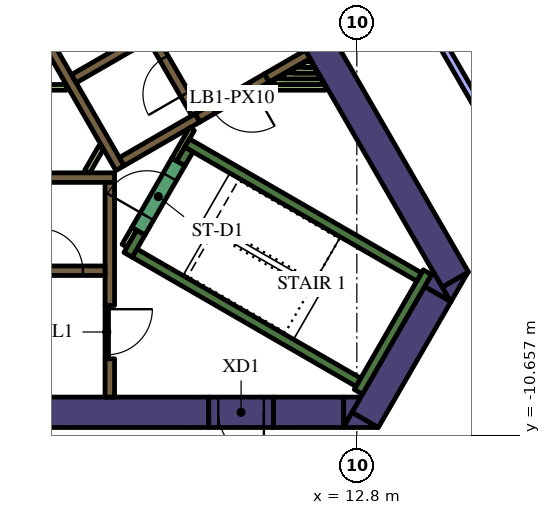
"""IFC4 building model, lengths in metres.
Left out: names, types, materials, properties, quantities, classifications, styles, units other than length and angle.
Written with IfcOpenShell. Run it as: python <this file> out.ifc"""

import sys

from ifc_helpers import new_model, si_unit, direction, frame, frame_2d, origin, place, context, subcontext, project, spatial, polyline, rectangle, outline, extrude, element, fill, save


model = new_model("IFC4")
c1 = context("Model", 3, precision=1e-05, world=origin(), true_north=direction((0.0, 1.0)))
c2 = subcontext(c1, "Body", "Model", "MODEL_VIEW")
j1 = project(units=[si_unit("LENGTHUNIT", "METRE"), si_unit("PLANEANGLEUNIT", "RADIAN")], contexts=[c1])
p1 = place(None, origin())
s1 = spatial("IfcSite", under=j1, at=p1, CompositionType="ELEMENT")
p2 = place(p1, origin())
s2 = spatial("IfcBuilding", under=s1, at=p2, CompositionType="ELEMENT")
p3 = place(p2, frame((0.0, 0.0, 166.8)))
s3 = spatial("IfcBuildingStorey", under=s2, at=p3, CompositionType="ELEMENT", Elevation=166.8)
p4 = place(p3, frame((9.129, 4.289, 0.0), z_axis=(0.0, 0.0, 1.0), x_axis=(0.499995742806, -0.866027861663, 0.0)))
e1 = element("IfcWall", 1, at=p4, inside=s3, PredefinedType="SOLIDWALL", context=c2, shape_type="SweptSolid", body=[
    extrude(rectangle(XDim=12.527, YDim=0.8, at=frame_2d((6.264, 0.0))), origin(), (0.0, 0.0, 1.0), 4.2),
])
p5 = place(p3, origin())
e2 = element("IfcWall", 2, at=p5, inside=s3, PredefinedType="SOLIDWALL", context=c2, shape_type="SweptSolid", body=[
    extrude(outline(polyline([(15.271, -7.15), (15.047, -6.762), (15.719, -6.374), (15.271, -7.15)])), origin(), (0.0, 0.0, 1.0), 4.2),
])
p6 = place(p3, frame((13.018, -10.252, 0.0), z_axis=(0.0, 0.0, 1.0), x_axis=(0.499984020225, 0.866034629516, 0.0)))
e3 = element("IfcWall", 3, at=p6, inside=s3, PredefinedType="SOLIDWALL", context=c2, shape_type="SweptSolid", body=[
    extrude(rectangle(XDim=3.824, YDim=0.8, at=frame_2d((1.912, 0.0))), origin(), (0.0, 0.0, 1.0), 4.2),
])
e4 = element("IfcWall", 4, at=p5, inside=s3, PredefinedType="SOLIDWALL", context=c2, shape_type="SweptSolid", body=[
    extrude(outline(polyline([(12.442, -10.45), (12.671, -10.053), (13.358, -10.45), (12.442, -10.45)])), origin(), (0.0, 0.0, 1.0), 4.2),
])
e5 = element("IfcWall", 5, at=p5, inside=s3, PredefinedType="SOLIDWALL", context=c2, shape_type="SweptSolid", body=[
    extrude(outline(polyline([(14.809, -6.35), (15.257, -7.126), (14.585, -6.738), (14.809, -6.35)])), origin(), (0.0, 0.0, 1.0), 4.2),
])
p7 = place(p3, frame((10.604, -10.05, 0.0), z_axis=(0.0, 0.0, 1.0), x_axis=(1.0, 0.0, 0.0)))
e6 = element("IfcWall", 6, at=p7, inside=s3, PredefinedType="SOLIDWALL", context=c2, shape_type="SweptSolid", body=[
    extrude(rectangle(XDim=1.849, YDim=0.8, at=frame_2d((0.925, 0.0))), origin(), (0.0, 0.0, 1.0), 4.2),
])
e7 = element("IfcWall", 7, at=p5, inside=s3, PredefinedType="SOLIDWALL", context=c2, shape_type="SweptSolid", body=[
    extrude(outline(polyline([(12.904, -9.65), (12.456, -10.426), (12.456, -9.65), (12.904, -9.65)])), origin(), (0.0, 0.0, 1.0), 4.2),
])
p8 = place(p3, frame((-13.378, -10.05, 0.0), z_axis=(0.0, 0.0, 1.0), x_axis=(1.0, 0.0, 0.0)))
e8 = element("IfcWall", 8, at=p8, inside=s3, PredefinedType="SOLIDWALL", context=c2, shape_type="SweptSolid", body=[
    extrude(rectangle(XDim=22.282, YDim=0.8, at=frame_2d((11.141, 0.0))), origin(), (0.0, 0.0, 1.0), 4.2),
])
p9 = place(p3, frame((12.84, -9.511, 0.0), z_axis=(0.0, 0.0, 1.0), x_axis=(0.499997733992, 0.866026712061, 0.0)))
e9 = element("IfcWall", 9, at=p9, inside=s3, PredefinedType="SOLIDWALL", context=c2, shape_type="SweptSolid", body=[
    extrude(rectangle(XDim=3.634, YDim=0.25, at=frame_2d((1.817, 0.0))), origin(), (0.0, 0.0, 1.0), 4.2),
])
p10 = place(p3, frame((12.84, -9.261, 0.0), z_axis=(0.0, 0.0, 1.0), x_axis=(-0.866013990052, 0.500019768644, 0.0)))
e10 = element("IfcWall", 10, at=p10, inside=s3, PredefinedType="SOLIDWALL", context=c2, shape_type="SweptSolid", body=[
    extrude(rectangle(XDim=6.8, YDim=0.25, at=frame_2d((3.4, 0.0))), origin(), (0.0, 0.0, 1.0), 4.2),
])
p11 = place(p3, frame((6.78, -5.906, 0.0), z_axis=(0.0, 0.0, 1.0), x_axis=(0.500223362819, 0.865896406789, 0.0)))
e11 = element("IfcWall", 11, at=p11, inside=s3, PredefinedType="SOLIDWALL", context=c2, shape_type="SweptSolid", body=[
    extrude(rectangle(XDim=0.675, YDim=0.25, at=frame_2d((0.337, 0.0))), origin(), (0.0, 0.0, 1.0), 4.2),
])
p12 = place(p3, frame((8.334, -2.964, 0.0), z_axis=(0.0, 0.0, 1.0), x_axis=(0.866016039709, -0.500016218704, 0.0)))
e12 = element("IfcWall", 12, at=p12, inside=s3, PredefinedType="SOLIDWALL", context=c2, shape_type="SweptSolid", body=[
    extrude(rectangle(XDim=7.05, YDim=0.25, at=frame_2d((3.525, 0.0))), origin(), (0.0, 0.0, 1.0), 4.2),
])
p13 = place(p3, frame((8.168, -3.503, 0.0), z_axis=(0.0, 0.0, 1.0), x_axis=(0.49972245349, 0.866185586049, 0.0)))
e13 = element("IfcWall", 13, at=p13, inside=s3, PredefinedType="SOLIDWALL", context=c2, shape_type="SweptSolid", body=[
    extrude(rectangle(XDim=0.425, YDim=0.25, at=frame_2d((0.212, 0.0))), origin(), (0.0, 0.0, 1.0), 4.2),
])
p14 = place(p3, frame((-5.545, -3.875, 0.0), z_axis=(0.0, 0.0, 1.0), x_axis=(1.0, 0.0, 0.0)))
e14 = element("IfcWall", 14, at=p14, inside=s3, PredefinedType="SOLIDWALL", context=c2, shape_type="SweptSolid", body=[
    extrude(rectangle(XDim=11.97, YDim=0.25, at=frame_2d((5.985, 0.0))), origin(), (0.0, 0.0, 1.0), 4.2),
])
p15 = place(p3, frame((6.3, -7.24, 0.0), z_axis=(0.0, 0.0, 1.0), x_axis=(0.0, 1.0, 0.0)))
e15 = element("IfcWall", 15, at=p15, inside=s3, PredefinedType="SOLIDWALL", context=c2, shape_type="SweptSolid", body=[
    extrude(rectangle(XDim=3.24, YDim=0.25, at=frame_2d((1.62, 0.0))), origin(), (0.0, 0.0, 1.0), 4.2),
])
p16 = place(p3, frame((6.3, -9.65, 0.0), z_axis=(0.0, 0.0, 1.0), x_axis=(0.0, 1.0, 0.0)))
e16 = element("IfcWall", 16, at=p16, inside=s3, PredefinedType="SOLIDWALL", context=c2, shape_type="SweptSolid", body=[
    extrude(rectangle(XDim=1.008, YDim=0.25, at=frame_2d((0.504, 0.0))), origin(), (0.0, 0.0, 1.0), 4.2),
])
p17 = place(p3, frame((11.507, -0.631, 0.0), z_axis=(0.0, 0.0, 1.0), x_axis=(-0.866025525965, -0.499999788377, 0.0)))
e17 = element("IfcWall", 17, at=p17, inside=s3, PredefinedType="SOLIDWALL", context=c2, shape_type="SweptSolid", body=[
    extrude(rectangle(XDim=1.245, YDim=0.25, at=frame_2d((0.622, 0.0))), origin(), (0.0, 0.0, 1.0), 4.2),
])
p18 = place(p3, frame((6.568, -3.627, 0.0), z_axis=(0.0, 0.0, 1.0), x_axis=(-0.499999455981, 0.866025717874, 0.0)))
e18 = element("IfcWall", 18, at=p18, inside=s3, PredefinedType="SOLIDWALL", context=c2, shape_type="SweptSolid", body=[
    extrude(rectangle(XDim=11.978, YDim=0.25, at=frame_2d((5.989, 0.0))), origin(), (0.0, 0.0, 1.0), 4.2),
])
p19 = place(p3, frame((5.354, -1.274, 0.0), z_axis=(0.0, 0.0, 1.0), x_axis=(0.866008176907, 0.50002983664, 0.0)))
e19 = element("IfcWall", 19, at=p19, inside=s3, PredefinedType="SOLIDWALL", context=c2, shape_type="SweptSolid", body=[
    extrude(rectangle(XDim=2.2, YDim=0.25, at=frame_2d((1.1, 0.0))), origin(), (0.0, 0.0, 1.0), 4.2),
])
p20 = place(p3, frame((6.614, -3.456, 0.0), z_axis=(0.0, 0.0, 1.0), x_axis=(0.866025089694, 0.500000544019, 0.0)))
e20 = element("IfcWall", 20, at=p20, inside=s3, PredefinedType="SOLIDWALL", context=c2, shape_type="SweptSolid", body=[
    extrude(rectangle(XDim=2.305, YDim=0.25, at=frame_2d((1.153, 0.0))), origin(), (0.0, 0.0, 1.0), 4.2),
])
p21 = place(p3, frame((10.362, -1.5, 0.0), z_axis=(0.0, 0.0, 1.0), x_axis=(1.0, 0.0, 0.0)))
e21 = element("IfcWall", 21, at=p21, inside=s3, PredefinedType="PARTITIONING", context=c2, shape_type="SweptSolid", body=[
    extrude(rectangle(XDim=1.61, YDim=0.15, at=frame_2d((0.805, 0.0))), origin(), (0.0, 0.0, 1.0), 3.15),
])
p22 = place(p3, frame((10.622, -1.35, 0.0), z_axis=(0.0, 0.0, 1.0), x_axis=(1.0, 0.0, 0.0)))
e22 = element("IfcWall", 22, at=p22, inside=s3, PredefinedType="PARTITIONING", context=c2, shape_type="SweptSolid", body=[
    extrude(rectangle(XDim=1.263, YDim=0.15, at=frame_2d((0.632, 0.0))), origin(), (0.0, 0.0, 1.0), 3.15),
])
p23 = place(p3, frame((10.882, -1.2, 0.0), z_axis=(0.0, 0.0, 1.0), x_axis=(1.0, 0.0, 0.0)))
e23 = element("IfcWall", 23, at=p23, inside=s3, PredefinedType="PARTITIONING", context=c2, shape_type="SweptSolid", body=[
    extrude(rectangle(XDim=0.917, YDim=0.15, at=frame_2d((0.459, 0.0))), origin(), (0.0, 0.0, 1.0), 3.15),
])
p24 = place(p3, frame((11.712, -1.05, 0.0), z_axis=(0.0, 0.0, 1.0), x_axis=(-1.0, 0.0, 0.0)))
e24 = element("IfcWall", 24, at=p24, inside=s3, PredefinedType="PARTITIONING", context=c2, shape_type="SweptSolid", body=[
    extrude(rectangle(XDim=0.571, YDim=0.15, at=frame_2d((0.285, 0.0))), origin(), (0.0, 0.0, 1.0), 3.15),
])
p25 = place(p3, frame((11.401, -0.9, 0.0), z_axis=(0.0, 0.0, 1.0), x_axis=(1.0, 0.0, 0.0)))
e25 = element("IfcWall", 25, at=p25, inside=s3, PredefinedType="PARTITIONING", context=c2, shape_type="SweptSolid", body=[
    extrude(rectangle(XDim=0.224, YDim=0.15, at=frame_2d((0.112, 0.0))), origin(), (0.0, 0.0, 1.0), 3.15),
])
p26 = place(p3, frame((6.945, -5.222, 0.0), z_axis=(0.0, 0.0, 1.0), x_axis=(-0.499818422106, -0.866130212453, 0.0)))
e26 = element("IfcWall", 26, at=p26, inside=s3, PredefinedType="PARTITIONING", context=c2, shape_type="SweptSolid", body=[
    extrude(rectangle(XDim=0.514, YDim=0.15, at=frame_2d((0.257, 0.0))), origin(), (0.0, 0.0, 1.0), 3.15),
])
p27 = place(p3, frame((8.459, -2.599, 0.0), z_axis=(0.0, 0.0, 1.0), x_axis=(-0.500041054325, -0.866001699761, 0.0)))
e27 = element("IfcWall", 27, at=p27, inside=s3, PredefinedType="PARTITIONING", context=c2, shape_type="SweptSolid", body=[
    extrude(rectangle(XDim=0.929, YDim=0.15, at=frame_2d((0.464, 0.0))), origin(), (0.0, 0.0, 1.0), 4.2),
])
p28 = place(p3, frame((5.705, -3.718, 0.0), z_axis=(0.0, 0.0, 1.0), x_axis=(0.499962090823, 0.866047289552, 0.0)))
e28 = element("IfcWall", 28, at=p28, inside=s3, PredefinedType="PARTITIONING", context=c2, shape_type="SweptSolid", body=[
    extrude(rectangle(XDim=0.735, YDim=0.15, at=frame_2d((0.367, 0.0))), origin(), (0.0, 0.0, 1.0), 3.15),
])
p29 = place(p3, frame((-4.2, -1.5, 0.0), z_axis=(0.0, 0.0, 1.0), x_axis=(1.0, 0.0, 0.0)))
e29 = element("IfcWall", 29, at=p29, inside=s3, PredefinedType="PARTITIONING", context=c2, shape_type="SweptSolid", body=[
    extrude(rectangle(XDim=9.359, YDim=0.15, at=frame_2d((4.68, 0.0))), origin(), (0.0, 0.0, 1.0), 3.15),
])
p30 = place(p3, frame((-6.175, -6.325, 0.0), z_axis=(0.0, 0.0, 1.0), x_axis=(1.0, 0.0, 0.0)))
e30 = element("IfcWall", 30, at=p30, inside=s3, PredefinedType="SOLIDWALL", context=c2, shape_type="SweptSolid", body=[
    extrude(rectangle(XDim=12.35, YDim=0.25, at=frame_2d((6.175, 0.0))), origin(), (0.0, 0.0, 1.0), 4.2),
])
p31 = place(p30, frame((0.585, 0.0, 0.0)))
e31 = element("IfcOpeningElement", 31, at=p31, cuts=e30, PredefinedType="OPENING", context=c2, shape_type="SweptSolid", body=[
    extrude(rectangle(XDim=1.1, YDim=2.1, at=frame_2d((0.55, 1.05))), frame((0.0, 0.135, 0.0), z_axis=(0.0, -1.0, 0.0), x_axis=(1.0, 0.0, 0.0)), (0.0, 0.0, 1.0), 0.27),
])
p32 = place(p30, frame((3.105, 0.0, 0.0)))
e32 = element("IfcOpeningElement", 32, at=p32, cuts=e30, PredefinedType="OPENING", context=c2, shape_type="SweptSolid", body=[
    extrude(rectangle(XDim=1.1, YDim=2.1, at=frame_2d((0.55, 1.05))), frame((0.0, 0.135, 0.0), z_axis=(0.0, -1.0, 0.0), x_axis=(1.0, 0.0, 0.0)), (0.0, 0.0, 1.0), 0.27),
])
p33 = place(p30, frame((5.625, 0.0, 0.0)))
e33 = element("IfcOpeningElement", 33, at=p33, cuts=e30, PredefinedType="OPENING", context=c2, shape_type="SweptSolid", body=[
    extrude(rectangle(XDim=1.1, YDim=2.1, at=frame_2d((0.55, 1.05))), frame((0.0, 0.135, 0.0), z_axis=(0.0, -1.0, 0.0), x_axis=(1.0, 0.0, 0.0)), (0.0, 0.0, 1.0), 0.27),
])
p34 = place(p30, frame((8.145, 0.0, 0.0)))
e34 = element("IfcOpeningElement", 34, at=p34, cuts=e30, PredefinedType="OPENING", context=c2, shape_type="SweptSolid", body=[
    extrude(rectangle(XDim=1.1, YDim=2.1, at=frame_2d((0.55, 1.05))), frame((0.0, 0.135, 0.0), z_axis=(0.0, -1.0, 0.0), x_axis=(1.0, 0.0, 0.0)), (0.0, 0.0, 1.0), 0.27),
])
p35 = place(p30, frame((10.665, 0.0, 0.0)))
e35 = element("IfcOpeningElement", 35, at=p35, cuts=e30, PredefinedType="OPENING", context=c2, shape_type="SweptSolid", body=[
    extrude(rectangle(XDim=1.1, YDim=2.1, at=frame_2d((0.55, 1.05))), frame((0.0, 0.135, 0.0), z_axis=(0.0, -1.0, 0.0), x_axis=(1.0, 0.0, 0.0)), (0.0, 0.0, 1.0), 0.27),
])
p36 = place(p3, frame((8.565, -2.185, 0.0), z_axis=(0.0, 0.0, 1.0), x_axis=(-0.499997954832, 0.866026584559, 0.0)))
e36 = element("IfcWall", 36, at=p36, inside=s3, PredefinedType="SOLIDWALL", context=c2, shape_type="SweptSolid", body=[
    extrude(rectangle(XDim=12.35, YDim=0.25, at=frame_2d((6.175, 0.0))), origin(), (0.0, 0.0, 1.0), 4.2),
])
p37 = place(p36, frame((0.585, 0.0, 0.0)))
e37 = element("IfcOpeningElement", 37, at=p37, cuts=e36, PredefinedType="OPENING", context=c2, shape_type="SweptSolid", body=[
    extrude(rectangle(XDim=1.1, YDim=2.1, at=frame_2d((0.55, 1.05))), frame((0.0, 0.135, 0.0), z_axis=(0.0, -1.0, 0.0), x_axis=(1.0, 0.0, 0.0)), (0.0, 0.0, 1.0), 0.27),
])
p38 = place(p3, frame((7.053, -5.284, 0.0), z_axis=(0.0, 0.0, 1.0), x_axis=(0.500078061341, 0.865980330357, 0.0)))
e38 = element("IfcWall", 38, at=p38, inside=s3, PredefinedType="SOLIDWALL", context=c2, shape_type="SweptSolid", body=[
    extrude(rectangle(XDim=2.1, YDim=0.4, at=frame_2d((1.05, 0.0))), origin(), (0.0, 0.0, 1.0), 4.2),
])
p39 = place(p38, frame((0.45, 0.0, 0.0)))
e39 = element("IfcOpeningElement", 39, at=p39, cuts=e38, PredefinedType="OPENING", context=c2, shape_type="SweptSolid", body=[
    extrude(rectangle(XDim=1.2, YDim=2.1, at=frame_2d((0.6, 1.05))), frame((0.0, 0.21, 0.0), z_axis=(0.0, -1.0, 0.0), x_axis=(1.0, 0.0, 0.0)), (0.0, 0.0, 1.0), 0.42),
])
p40 = place(p3, frame((6.22, -7.237, 0.0), z_axis=(0.0, 0.0, 1.0), x_axis=(0.0, -1.0, 0.0)))
e40 = element("IfcWall", 40, at=p40, inside=s3, PredefinedType="PARTITIONING", context=c2, shape_type="SweptSolid", body=[
    extrude(rectangle(XDim=1.4, YDim=0.09, at=frame_2d((0.7, 0.0))), origin(), (0.0, 0.0, 1.0), 3.15),
])
p41 = place(p40, frame((0.1, 0.0, 0.0)))
e41 = element("IfcOpeningElement", 41, at=p41, cuts=e40, PredefinedType="OPENING", context=c2, shape_type="SweptSolid", body=[
    extrude(rectangle(XDim=1.2, YDim=2.1, at=frame_2d((0.6, 1.05))), frame((0.0, 0.055, 0.0), z_axis=(0.0, -1.0, 0.0), x_axis=(1.0, 0.0, 0.0)), (0.0, 0.0, 1.0), 0.11),
])
p42 = place(p3, frame((10.429, -1.253, 0.0), z_axis=(0.0, 0.0, 1.0), x_axis=(-0.866009402589, -0.500027713859, 0.0)))
e42 = element("IfcWall", 42, at=p42, inside=s3, PredefinedType="SOLIDWALL", context=c2, shape_type="SweptSolid", body=[
    extrude(rectangle(XDim=2.1, YDim=0.25, at=frame_2d((1.05, 0.0))), origin(), (0.0, 0.0, 1.0), 4.2),
])
p43 = place(p42, frame((0.45, 0.0, 0.0)))
e43 = element("IfcOpeningElement", 43, at=p43, cuts=e42, PredefinedType="OPENING", context=c2, shape_type="SweptSolid", body=[
    extrude(rectangle(XDim=1.2, YDim=2.1, at=frame_2d((0.6, 1.05))), frame((0.0, 0.135, 0.0), z_axis=(0.0, -1.0, 0.0), x_axis=(1.0, 0.0, 0.0)), (0.0, 0.0, 1.0), 0.27),
])
p44 = place(p3, frame((10.604, -10.05, 0.0), z_axis=(0.0, 0.0, 1.0), x_axis=(-1.0, 0.0, 0.0)))
e44 = element("IfcWall", 44, at=p44, inside=s3, PredefinedType="SOLIDWALL", context=c2, shape_type="SweptSolid", body=[
    extrude(rectangle(XDim=1.7, YDim=0.8, at=frame_2d((0.85, 0.0))), origin(), (0.0, 0.0, 1.0), 4.2),
])
p45 = place(p44, frame((0.25, 0.0, 0.0)))
e45 = element("IfcOpeningElement", 45, at=p45, cuts=e44, PredefinedType="OPENING", context=c2, shape_type="SweptSolid", body=[
    extrude(rectangle(XDim=1.2, YDim=2.1, at=frame_2d((0.6, 1.05))), frame((0.0, 0.41, 0.0), z_axis=(0.0, -1.0, 0.0), x_axis=(1.0, 0.0, 0.0)), (0.0, 0.0, 1.0), 0.82),
])
p46 = place(p3, frame((14.766, -12.824, 0.0), z_axis=(0.0, 0.0, 1.0), x_axis=(0.500009869004, 0.866019705837, 0.0)))
e46 = element("IfcWall", 46, at=p46, inside=s3, PredefinedType="PARTITIONING", context=c2, shape_type="SweptSolid", body=[
    extrude(rectangle(XDim=7.475, YDim=0.2, at=frame_2d((3.738, 0.0))), origin(), (0.0, 0.0, 1.0), 3.15),
])
p47 = place(p3, frame((18.489, -6.324, 0.0), z_axis=(0.0, 0.0, 1.0), x_axis=(-0.500003913404, 0.866023144368, 0.0)))
e47 = element("IfcWall", 47, at=p47, inside=s3, PredefinedType="PARTITIONING", context=c2, shape_type="SweptSolid", body=[
    extrude(rectangle(XDim=8.234, YDim=0.2, at=frame_2d((4.117, 0.0))), origin(), (0.0, 0.0, 1.0), 3.15),
])
p48 = place(p35, origin())
e48 = element("IfcDoor", 48, at=p48, inside=s3, OperationType="DOUBLE_DOOR_SLIDING", PredefinedType="DOOR", context=c2, shape_type="SweptSolid", body=[
    extrude(rectangle(XDim=1.1, YDim=2.1, at=frame_2d((0.55, 1.05))), frame((0.0, 0.025, 0.0), z_axis=(0.0, -1.0, 0.0), x_axis=(1.0, 0.0, 0.0)), (0.0, 0.0, 1.0), 0.05),
])
fill(e35, e48)
p49 = place(p37, origin())
e49 = element("IfcDoor", 49, at=p49, inside=s3, OperationType="DOUBLE_DOOR_SLIDING", PredefinedType="DOOR", context=c2, shape_type="SweptSolid", body=[
    extrude(rectangle(XDim=1.1, YDim=2.1, at=frame_2d((0.55, 1.05))), frame((0.0, 0.025, 0.0), z_axis=(0.0, -1.0, 0.0), x_axis=(1.0, 0.0, 0.0)), (0.0, 0.0, 1.0), 0.05),
])
fill(e37, e49)
p50 = place(p39, origin())
e50 = element("IfcDoor", 50, at=p50, inside=s3, OperationType="SINGLE_SWING_LEFT", PredefinedType="DOOR", context=c2, shape_type="SweptSolid", body=[
    extrude(rectangle(XDim=1.2, YDim=2.1, at=frame_2d((0.6, 1.05))), frame((0.0, 0.025, 0.0), z_axis=(0.0, -1.0, 0.0), x_axis=(1.0, 0.0, 0.0)), (0.0, 0.0, 1.0), 0.05),
])
fill(e39, e50)
p51 = place(p41, origin())
e51 = element("IfcDoor", 51, at=p51, inside=s3, OperationType="SINGLE_SWING_LEFT", PredefinedType="DOOR", context=c2, shape_type="SweptSolid", body=[
    extrude(rectangle(XDim=1.2, YDim=2.1, at=frame_2d((0.6, 1.05))), frame((0.0, 0.025, 0.0), z_axis=(0.0, -1.0, 0.0), x_axis=(1.0, 0.0, 0.0)), (0.0, 0.0, 1.0), 0.05),
])
fill(e41, e51)
p52 = place(p43, origin())
e52 = element("IfcDoor", 52, at=p52, inside=s3, OperationType="SINGLE_SWING_LEFT", PredefinedType="DOOR", context=c2, shape_type="SweptSolid", body=[
    extrude(rectangle(XDim=1.2, YDim=2.1, at=frame_2d((0.6, 1.05))), frame((0.0, 0.025, 0.0), z_axis=(0.0, -1.0, 0.0), x_axis=(1.0, 0.0, 0.0)), (0.0, 0.0, 1.0), 0.05),
])
fill(e43, e52)
p53 = place(p45, origin())
e53 = element("IfcDoor", 53, at=p53, inside=s3, OperationType="SINGLE_SWING_LEFT", PredefinedType="DOOR", context=c2, shape_type="SweptSolid", body=[
    extrude(rectangle(XDim=1.2, YDim=2.1, at=frame_2d((0.6, 1.05))), frame((0.0, 0.025, 0.0), z_axis=(0.0, -1.0, 0.0), x_axis=(1.0, 0.0, 0.0)), (0.0, 0.0, 1.0), 0.05),
])
fill(e45, e53)
save(model, sys.argv[1])
